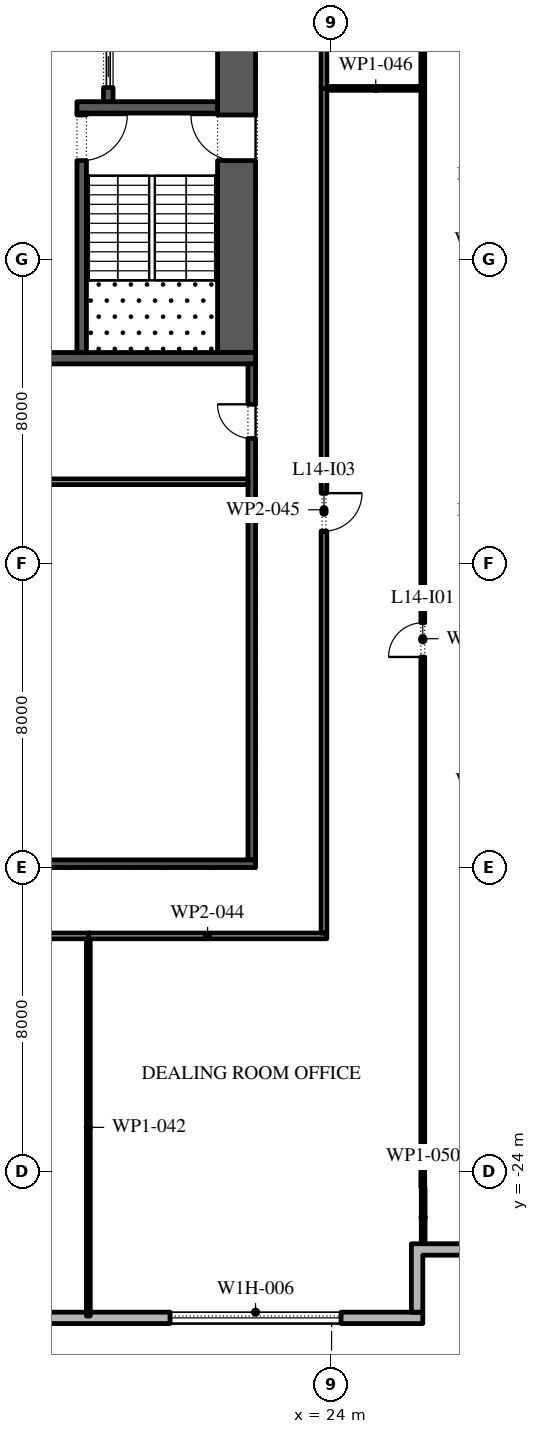
"""IFC4 building model, lengths in metres.
Left out: names, types, materials, properties, quantities, classifications, styles, units other than length and angle.
Written with IfcOpenShell. Run it as: python <this file> out.ifc"""

import sys

from ifc_helpers import new_model, si_unit, direction, frame, frame_2d, origin, place, context, subcontext, project, spatial, polyline, rectangle, outline, extrude, element, fill, save


model = new_model("IFC4")
c1 = context("Model", 3, precision=1e-05, world=origin(), true_north=direction((0.0, 1.0)))
c2 = subcontext(c1, "Body", "Model", "MODEL_VIEW")
j1 = project(units=[si_unit("LENGTHUNIT", "METRE"), si_unit("PLANEANGLEUNIT", "RADIAN")], contexts=[c1])
p1 = place(None, origin())
s1 = spatial("IfcSite", under=j1, at=p1, CompositionType="ELEMENT")
p2 = place(p1, origin())
s2 = spatial("IfcBuilding", under=s1, at=p2, CompositionType="ELEMENT")
p3 = place(p2, frame((0.0, 0.0, 69.0)))
s3 = spatial("IfcBuildingStorey", under=s2, at=p3, CompositionType="ELEMENT", Elevation=69.0)
p4 = place(p3, frame((-26.1, -27.85, 0.0), z_axis=(0.0, 0.0, 1.0), x_axis=(1.0, 0.0, 0.0)))
e1 = element("IfcWall", 1, at=p4, inside=s3, PredefinedType="STANDARD", context=c2, shape_type="SweptSolid", body=[
    extrude(rectangle(XDim=52.5, YDim=0.3, at=frame_2d((26.25, 0.0))), origin(), (0.0, 0.0, 1.0), 4.0),
])
p5 = place(p4, frame((2.0, 0.0, 0.45)))
e2 = element("IfcOpeningElement", 2, at=p5, cuts=e1, PredefinedType="OPENING", context=c2, shape_type="SweptSolid", body=[
    extrude(rectangle(XDim=4.5, YDim=2.75, at=frame_2d((2.25, 1.375))), frame((0.0, 0.16, 0.0), z_axis=(0.0, -1.0, 0.0), x_axis=(1.0, 0.0, 0.0)), (0.0, 0.0, 1.0), 0.32),
])
p6 = place(p4, frame((10.65, 0.0, 0.45)))
e3 = element("IfcOpeningElement", 3, at=p6, cuts=e1, PredefinedType="OPENING", context=c2, shape_type="SweptSolid", body=[
    extrude(rectangle(XDim=4.5, YDim=2.75, at=frame_2d((2.25, 1.375))), frame((0.0, 0.16, 0.0), z_axis=(0.0, -1.0, 0.0), x_axis=(1.0, 0.0, 0.0)), (0.0, 0.0, 1.0), 0.32),
])
p7 = place(p4, frame((20.5, 0.0, 0.0)))
e4 = element("IfcOpeningElement", 4, at=p7, cuts=e1, PredefinedType="OPENING", context=c2, shape_type="SweptSolid", body=[
    extrude(rectangle(XDim=2.4, YDim=3.5, at=frame_2d((1.2, 1.75))), frame((0.0, 0.16, 0.0), z_axis=(0.0, -1.0, 0.0), x_axis=(1.0, 0.0, 0.0)), (0.0, 0.0, 1.0), 0.32),
])
p8 = place(p4, frame((28.25, 0.0, 0.45)))
e5 = element("IfcOpeningElement", 5, at=p8, cuts=e1, PredefinedType="OPENING", context=c2, shape_type="SweptSolid", body=[
    extrude(rectangle(XDim=4.5, YDim=2.75, at=frame_2d((2.25, 1.375))), frame((0.0, 0.16, 0.0), z_axis=(0.0, -1.0, 0.0), x_axis=(1.0, 0.0, 0.0)), (0.0, 0.0, 1.0), 0.32),
])
p9 = place(p4, frame((37.05, 0.0, 0.45)))
e6 = element("IfcOpeningElement", 6, at=p9, cuts=e1, PredefinedType="OPENING", context=c2, shape_type="SweptSolid", body=[
    extrude(rectangle(XDim=4.5, YDim=2.75, at=frame_2d((2.25, 1.375))), frame((0.0, 0.16, 0.0), z_axis=(0.0, -1.0, 0.0), x_axis=(1.0, 0.0, 0.0)), (0.0, 0.0, 1.0), 0.32),
])
p10 = place(p4, frame((45.85, 0.0, 0.45)))
e7 = element("IfcOpeningElement", 7, at=p10, cuts=e1, PredefinedType="OPENING", context=c2, shape_type="SweptSolid", body=[
    extrude(rectangle(XDim=4.5, YDim=2.75, at=frame_2d((2.25, 1.375))), frame((0.0, 0.16, 0.0), z_axis=(0.0, -1.0, 0.0), x_axis=(1.0, 0.0, 0.0)), (0.0, 0.0, 1.0), 0.32),
])
p11 = place(p3, origin())
e8 = element("IfcWall", 8, at=p11, inside=s3, PredefinedType="STANDARD", context=c2, shape_type="SweptSolid", body=[
    extrude(outline(polyline([(27.9, -25.9), (27.9, -24.1), (30.0, -24.1), (30.0, -24.4), (28.2, -24.4), (28.2, -26.2), (26.4, -26.2), (26.4, -27.7), (26.1, -27.7), (26.1, -25.9), (27.9, -25.9)])), origin(), (0.0, 0.0, 1.0), 4.0),
])
p12 = place(p3, frame((21.5, -2.45, 0.0), z_axis=(0.0, 0.0, 1.0), x_axis=(0.0, 1.0, 0.0)))
e9 = element("IfcWall", 9, at=p12, inside=s3, PredefinedType="SHEAR", context=c2, shape_type="SweptSolid", body=[
    extrude(rectangle(XDim=27.9, YDim=1.0, at=frame_2d((13.95, 0.0))), origin(), (0.0, 0.0, 1.0), 4.0),
])
p13 = place(p12, frame((5.05, 0.0, 0.0)))
e10 = element("IfcOpeningElement", 10, at=p13, cuts=e9, PredefinedType="OPENING", context=c2, shape_type="SweptSolid", body=[
    extrude(rectangle(XDim=1.2, YDim=2.1, at=frame_2d((0.6, 1.05))), frame((0.0, 0.51, 0.0), z_axis=(0.0, -1.0, 0.0), x_axis=(1.0, 0.0, 0.0)), (0.0, 0.0, 1.0), 1.02),
])
p14 = place(p12, frame((21.65, 0.0, 0.0)))
e11 = element("IfcOpeningElement", 11, at=p14, cuts=e9, PredefinedType="OPENING", context=c2, shape_type="SweptSolid", body=[
    extrude(rectangle(XDim=1.2, YDim=2.1, at=frame_2d((0.6, 1.05))), frame((0.0, 0.51, 0.0), z_axis=(0.0, -1.0, 0.0), x_axis=(1.0, 0.0, 0.0)), (0.0, 0.0, 1.0), 1.02),
])
p15 = place(p3, frame((10.0, -2.6, 0.0), z_axis=(0.0, 0.0, 1.0), x_axis=(1.0, 0.0, 0.0)))
e12 = element("IfcWall", 12, at=p15, inside=s3, PredefinedType="SHEAR", context=c2, shape_type="SweptSolid", body=[
    extrude(rectangle(XDim=12.0, YDim=0.3, at=frame_2d((6.0, 0.0))), origin(), (0.0, 0.0, 1.0), 4.0),
])
p16 = place(p3, frame((17.3, 4.0, 0.0), z_axis=(0.0, 0.0, 1.0), x_axis=(1.0, 0.0, 0.0)))
e13 = element("IfcWall", 13, at=p16, inside=s3, PredefinedType="SHEAR", context=c2, shape_type="SweptSolid", body=[
    extrude(rectangle(XDim=3.7, YDim=0.3, at=frame_2d((1.85, 0.0))), origin(), (0.0, 0.0, 1.0), 4.0),
])
p17 = place(p3, frame((17.425, -2.45, 0.0), z_axis=(0.0, 0.0, 1.0), x_axis=(0.0, 1.0, 0.0)))
e14 = element("IfcWall", 14, at=p17, inside=s3, PredefinedType="SHEAR", context=c2, shape_type="SweptSolid", body=[
    extrude(rectangle(XDim=6.3, YDim=0.25, at=frame_2d((3.15, 0.0))), origin(), (0.0, 0.0, 1.0), 4.0),
])
p18 = place(p17, frame((5.05, 0.0, 0.0)))
e15 = element("IfcOpeningElement", 15, at=p18, cuts=e14, PredefinedType="OPENING", context=c2, shape_type="SweptSolid", body=[
    extrude(rectangle(XDim=1.2, YDim=2.1, at=frame_2d((0.6, 1.05))), frame((0.0, 0.135, 0.0), z_axis=(0.0, -1.0, 0.0), x_axis=(1.0, 0.0, 0.0)), (0.0, 0.0, 1.0), 0.27),
])
p19 = place(p3, frame((18.125, 4.15, 0.0), z_axis=(0.0, 0.0, 1.0), x_axis=(0.0, 1.0, 0.0)))
e16 = element("IfcWall", 16, at=p19, inside=s3, PredefinedType="SHEAR", context=c2, shape_type="SweptSolid", body=[
    extrude(rectangle(XDim=14.7, YDim=0.25, at=frame_2d((7.35, 0.0))), origin(), (0.0, 0.0, 1.0), 4.0),
])
p20 = place(p19, frame((0.371, 0.0, 0.0)))
e17 = element("IfcOpeningElement", 17, at=p20, cuts=e16, PredefinedType="OPENING", context=c2, shape_type="SweptSolid", body=[
    extrude(rectangle(XDim=1.1, YDim=2.1, at=frame_2d((0.55, 1.05))), frame((0.0, 0.135, 0.0), z_axis=(0.0, -1.0, 0.0), x_axis=(1.0, 0.0, 0.0)), (0.0, 0.0, 1.0), 0.27),
])
p21 = place(p19, frame((2.514, 0.0, 0.0)))
e18 = element("IfcOpeningElement", 18, at=p21, cuts=e16, PredefinedType="OPENING", context=c2, shape_type="SweptSolid", body=[
    extrude(rectangle(XDim=1.1, YDim=2.1, at=frame_2d((0.55, 1.05))), frame((0.0, 0.135, 0.0), z_axis=(0.0, -1.0, 0.0), x_axis=(1.0, 0.0, 0.0)), (0.0, 0.0, 1.0), 0.27),
])
p22 = place(p19, frame((4.657, 0.0, 0.0)))
e19 = element("IfcOpeningElement", 19, at=p22, cuts=e16, PredefinedType="OPENING", context=c2, shape_type="SweptSolid", body=[
    extrude(rectangle(XDim=1.1, YDim=2.1, at=frame_2d((0.55, 1.05))), frame((0.0, 0.135, 0.0), z_axis=(0.0, -1.0, 0.0), x_axis=(1.0, 0.0, 0.0)), (0.0, 0.0, 1.0), 0.27),
])
p23 = place(p19, frame((6.8, 0.0, 0.0)))
e20 = element("IfcOpeningElement", 20, at=p23, cuts=e16, PredefinedType="OPENING", context=c2, shape_type="SweptSolid", body=[
    extrude(rectangle(XDim=1.1, YDim=2.1, at=frame_2d((0.55, 1.05))), frame((0.0, 0.135, 0.0), z_axis=(0.0, -1.0, 0.0), x_axis=(1.0, 0.0, 0.0)), (0.0, 0.0, 1.0), 0.27),
])
p24 = place(p19, frame((8.943, 0.0, 0.0)))
e21 = element("IfcOpeningElement", 21, at=p24, cuts=e16, PredefinedType="OPENING", context=c2, shape_type="SweptSolid", body=[
    extrude(rectangle(XDim=1.1, YDim=2.1, at=frame_2d((0.55, 1.05))), frame((0.0, 0.135, 0.0), z_axis=(0.0, -1.0, 0.0), x_axis=(1.0, 0.0, 0.0)), (0.0, 0.0, 1.0), 0.27),
])
p25 = place(p19, frame((11.086, 0.0, 0.0)))
e22 = element("IfcOpeningElement", 22, at=p25, cuts=e16, PredefinedType="OPENING", context=c2, shape_type="SweptSolid", body=[
    extrude(rectangle(XDim=1.1, YDim=2.1, at=frame_2d((0.55, 1.05))), frame((0.0, 0.135, 0.0), z_axis=(0.0, -1.0, 0.0), x_axis=(1.0, 0.0, 0.0)), (0.0, 0.0, 1.0), 0.27),
])
p26 = place(p19, frame((13.229, 0.0, 0.0)))
e23 = element("IfcOpeningElement", 23, at=p26, cuts=e16, PredefinedType="OPENING", context=c2, shape_type="SweptSolid", body=[
    extrude(rectangle(XDim=1.1, YDim=2.1, at=frame_2d((0.55, 1.05))), frame((0.0, 0.135, 0.0), z_axis=(0.0, -1.0, 0.0), x_axis=(1.0, 0.0, 0.0)), (0.0, 0.0, 1.0), 0.27),
])
p27 = place(p3, frame((21.9, -15.8, 0.0), z_axis=(0.0, 0.0, 1.0), x_axis=(0.0, 1.0, 0.0)))
e24 = element("IfcWall", 24, at=p27, inside=s3, PredefinedType="SHEAR", context=c2, shape_type="SweptSolid", body=[
    extrude(rectangle(XDim=13.05, YDim=0.2, at=frame_2d((6.525, 0.0))), origin(), (0.0, 0.0, 1.0), 4.0),
])
p28 = place(p27, frame((11.087, 0.0, 0.0)))
e25 = element("IfcOpeningElement", 25, at=p28, cuts=e24, PredefinedType="OPENING", context=c2, shape_type="SweptSolid", body=[
    extrude(rectangle(XDim=0.9, YDim=2.1, at=frame_2d((0.45, 1.05))), frame((0.0, 0.11, 0.0), z_axis=(0.0, -1.0, 0.0), x_axis=(1.0, 0.0, 0.0)), (0.0, 0.0, 1.0), 0.22),
])
p29 = place(p3, frame((10.0, -15.9, 0.0), z_axis=(0.0, 0.0, 1.0), x_axis=(1.0, 0.0, 0.0)))
e26 = element("IfcWall", 26, at=p29, inside=s3, PredefinedType="SHEAR", context=c2, shape_type="SweptSolid", body=[
    extrude(rectangle(XDim=12.0, YDim=0.2, at=frame_2d((6.0, 0.0))), origin(), (0.0, 0.0, 1.0), 4.0),
])
p30 = place(p3, frame((10.2, -5.85, 0.0), z_axis=(0.0, 0.0, 1.0), x_axis=(1.0, 0.0, 0.0)))
e27 = element("IfcWall", 27, at=p30, inside=s3, PredefinedType="PARTITIONING", context=c2, shape_type="SweptSolid", body=[
    extrude(rectangle(XDim=11.6, YDim=0.15, at=frame_2d((5.8, 0.0))), origin(), (0.0, 0.0, 1.0), 4.0),
])
p31 = place(p3, frame((17.65, -17.8, 0.0), z_axis=(0.0, 0.0, 1.0), x_axis=(-1.0, 0.0, 0.0)))
e28 = element("IfcWall", 28, at=p31, inside=s3, PredefinedType="PARTITIONING", context=c2, shape_type="SweptSolid", body=[
    extrude(rectangle(XDim=8.8, YDim=0.15, at=frame_2d((4.4, 0.0))), origin(), (0.0, 0.0, 1.0), 4.0),
])
p32 = place(p31, frame((5.7, 0.0, 0.0)))
e29 = element("IfcOpeningElement", 29, at=p32, cuts=e28, PredefinedType="OPENING", context=c2, shape_type="SweptSolid", body=[
    extrude(rectangle(XDim=1.0, YDim=2.1, at=frame_2d((0.5, 1.05))), frame((0.0, 0.085, 0.0), z_axis=(0.0, -1.0, 0.0), x_axis=(1.0, 0.0, 0.0)), (0.0, 0.0, 1.0), 0.17),
])
p33 = place(p3, frame((17.6, -17.875, 0.0), z_axis=(0.0, 0.0, 1.0), x_axis=(0.0, -1.0, 0.0)))
e30 = element("IfcWall", 30, at=p33, inside=s3, PredefinedType="PARTITIONING", context=c2, shape_type="SweptSolid", body=[
    extrude(rectangle(XDim=9.925, YDim=0.1, at=frame_2d((4.962, 0.0))), origin(), (0.0, 0.0, 1.0), 4.0),
])
p34 = place(p3, frame((23.875, -17.8, 0.0), z_axis=(0.0, 0.0, 1.0), x_axis=(-1.0, 0.0, 0.0)))
e31 = element("IfcWall", 31, at=p34, inside=s3, PredefinedType="PARTITIONING", context=c2, shape_type="SweptSolid", body=[
    extrude(rectangle(XDim=6.275, YDim=0.15, at=frame_2d((3.137, 0.0))), origin(), (0.0, 0.0, 1.0), 4.0),
])
p35 = place(p3, frame((23.8, 4.55, 0.0), z_axis=(0.0, 0.0, 1.0), x_axis=(0.0, -1.0, 0.0)))
e32 = element("IfcWall", 32, at=p35, inside=s3, PredefinedType="PARTITIONING", context=c2, shape_type="SweptSolid", body=[
    extrude(rectangle(XDim=22.275, YDim=0.15, at=frame_2d((11.138, 0.0))), origin(), (0.0, 0.0, 1.0), 4.0),
])
p36 = place(p35, frame((10.7, 0.0, 0.0)))
e33 = element("IfcOpeningElement", 33, at=p36, cuts=e32, PredefinedType="OPENING", context=c2, shape_type="SweptSolid", body=[
    extrude(rectangle(XDim=1.0, YDim=2.1, at=frame_2d((0.5, 1.05))), frame((0.0, 0.085, 0.0), z_axis=(0.0, -1.0, 0.0), x_axis=(1.0, 0.0, 0.0)), (0.0, 0.0, 1.0), 0.17),
])
p37 = place(p3, frame((23.875, 4.5, 0.0), z_axis=(0.0, 0.0, 1.0), x_axis=(1.0, 0.0, 0.0)))
e34 = element("IfcWall", 34, at=p37, inside=s3, PredefinedType="PARTITIONING", context=c2, shape_type="SweptSolid", body=[
    extrude(rectangle(XDim=2.575, YDim=0.1, at=frame_2d((1.288, 0.0))), origin(), (0.0, 0.0, 1.0), 4.0),
])
p38 = place(p3, frame((23.8, 27.2, 0.0), z_axis=(0.0, 0.0, 1.0), x_axis=(0.0, -1.0, 0.0)))
e35 = element("IfcWall", 35, at=p38, inside=s3, PredefinedType="PARTITIONING", context=c2, shape_type="SweptSolid", body=[
    extrude(rectangle(XDim=22.7, YDim=0.15, at=frame_2d((11.35, 0.0))), origin(), (0.0, 0.0, 1.0), 4.0),
])
p39 = place(p38, frame((10.8, 0.0, 0.0)))
e36 = element("IfcOpeningElement", 36, at=p39, cuts=e35, PredefinedType="OPENING", context=c2, shape_type="SweptSolid", body=[
    extrude(rectangle(XDim=1.0, YDim=2.1, at=frame_2d((0.5, 1.05))), frame((0.0, 0.085, 0.0), z_axis=(0.0, -1.0, 0.0), x_axis=(1.0, 0.0, 0.0)), (0.0, 0.0, 1.0), 0.17),
])
p40 = place(p3, frame((26.4, -24.41, 0.0), z_axis=(0.0, 0.0, 1.0), x_axis=(0.0, 1.0, 0.0)))
e37 = element("IfcWall", 37, at=p40, inside=s3, PredefinedType="PARTITIONING", context=c2, shape_type="SweptSolid", body=[
    extrude(rectangle(XDim=28.86, YDim=0.1, at=frame_2d((14.43, 0.0))), origin(), (0.0, 0.0, 1.0), 4.0),
])
p41 = place(p40, frame((13.95, 0.0, 0.0)))
e38 = element("IfcOpeningElement", 38, at=p41, cuts=e37, PredefinedType="OPENING", context=c2, shape_type="SweptSolid", body=[
    extrude(rectangle(XDim=0.9, YDim=2.1, at=frame_2d((0.45, 1.05))), frame((0.0, 0.06, 0.0), z_axis=(0.0, -1.0, 0.0), x_axis=(1.0, 0.0, 0.0)), (0.0, 0.0, 1.0), 0.12),
])
p42 = place(p3, frame((26.4, 4.55, 0.0), z_axis=(0.0, 0.0, 1.0), x_axis=(0.0, 1.0, 0.0)))
e39 = element("IfcWall", 39, at=p42, inside=s3, PredefinedType="PARTITIONING", context=c2, shape_type="SweptSolid", body=[
    extrude(rectangle(XDim=20.86, YDim=0.1, at=frame_2d((10.43, 0.0))), origin(), (0.0, 0.0, 1.0), 4.0),
])
p43 = place(p3, frame((26.41, -26.0, 0.0), z_axis=(0.0, 0.0, 1.0), x_axis=(0.0, 1.0, 0.0)))
e40 = element("IfcWall", 40, at=p43, inside=s3, PredefinedType="PARTITIONING", context=c2, shape_type="SweptSolid", body=[
    extrude(rectangle(XDim=1.59, YDim=0.1, at=frame_2d((0.795, 0.0))), origin(), (0.0, 0.0, 1.0), 4.0),
])
p44 = place(p10, origin())
e41 = element("IfcWindow", 41, at=p44, inside=s3, PartitioningType="DOUBLE_PANEL_VERTICAL", PredefinedType="WINDOW", context=c2, shape_type="SweptSolid", body=[
    extrude(rectangle(XDim=4.5, YDim=2.75, at=frame_2d((2.25, 1.375))), frame((0.0, 0.03, 0.0), z_axis=(0.0, -1.0, 0.0), x_axis=(1.0, 0.0, 0.0)), (0.0, 0.0, 1.0), 0.06),
])
fill(e7, e41)
p45 = place(p20, origin())
e42 = element("IfcDoor", 42, at=p45, inside=s3, OperationType="SLIDING_TO_LEFT", PredefinedType="DOOR", context=c2, shape_type="SweptSolid", body=[
    extrude(rectangle(XDim=1.1, YDim=2.1, at=frame_2d((0.55, 1.05))), frame((0.0, 0.025, 0.0), z_axis=(0.0, -1.0, 0.0), x_axis=(1.0, 0.0, 0.0)), (0.0, 0.0, 1.0), 0.05),
])
fill(e17, e42)
p46 = place(p18, frame((1.2, 0.0, 0.0), z_axis=(0.0, 0.0, 1.0), x_axis=(-1.0, 0.0, 0.0)))
e43 = element("IfcDoor", 43, at=p46, inside=s3, OperationType="SINGLE_SWING_RIGHT", PredefinedType="DOOR", context=c2, shape_type="SweptSolid", body=[
    extrude(rectangle(XDim=1.2, YDim=2.1, at=frame_2d((0.6, 1.05))), frame((0.0, 0.025, 0.0), z_axis=(0.0, -1.0, 0.0), x_axis=(1.0, 0.0, 0.0)), (0.0, 0.0, 1.0), 0.05),
])
fill(e15, e43)
p47 = place(p13, origin())
e44 = element("IfcDoor", 44, at=p47, inside=s3, OperationType="SINGLE_SWING_LEFT", PredefinedType="DOOR", context=c2, shape_type="SweptSolid", body=[
    extrude(rectangle(XDim=1.2, YDim=2.1, at=frame_2d((0.6, 1.05))), frame((0.0, 0.025, 0.0), z_axis=(0.0, -1.0, 0.0), x_axis=(1.0, 0.0, 0.0)), (0.0, 0.0, 1.0), 0.05),
])
fill(e10, e44)
p48 = place(p28, origin())
e45 = element("IfcDoor", 45, at=p48, inside=s3, OperationType="SINGLE_SWING_LEFT", PredefinedType="DOOR", context=c2, shape_type="SweptSolid", body=[
    extrude(rectangle(XDim=0.9, YDim=2.1, at=frame_2d((0.45, 1.05))), frame((0.0, 0.1, 0.0), z_axis=(0.0, -1.0, 0.0), x_axis=(1.0, 0.0, 0.0)), (0.0, 0.0, 1.0), 0.05),
])
fill(e25, e45)
p49 = place(p41, origin())
e46 = element("IfcDoor", 46, at=p49, inside=s3, OperationType="SINGLE_SWING_RIGHT", PredefinedType="DOOR", context=c2, shape_type="SweptSolid", body=[
    extrude(rectangle(XDim=0.9, YDim=2.1, at=frame_2d((0.45, 1.05))), frame((0.0, 0.025, 0.0), z_axis=(0.0, -1.0, 0.0), x_axis=(1.0, 0.0, 0.0)), (0.0, 0.0, 1.0), 0.05),
])
fill(e38, e46)
p50 = place(p36, origin())
e47 = element("IfcDoor", 47, at=p50, inside=s3, OperationType="SINGLE_SWING_RIGHT", PredefinedType="DOOR", context=c2, shape_type="SweptSolid", body=[
    extrude(rectangle(XDim=1.0, YDim=2.1, at=frame_2d((0.5, 1.05))), frame((0.0, 0.025, 0.0), z_axis=(0.0, -1.0, 0.0), x_axis=(1.0, 0.0, 0.0)), (0.0, 0.0, 1.0), 0.05),
])
fill(e33, e47)
save(model, sys.argv[1])
